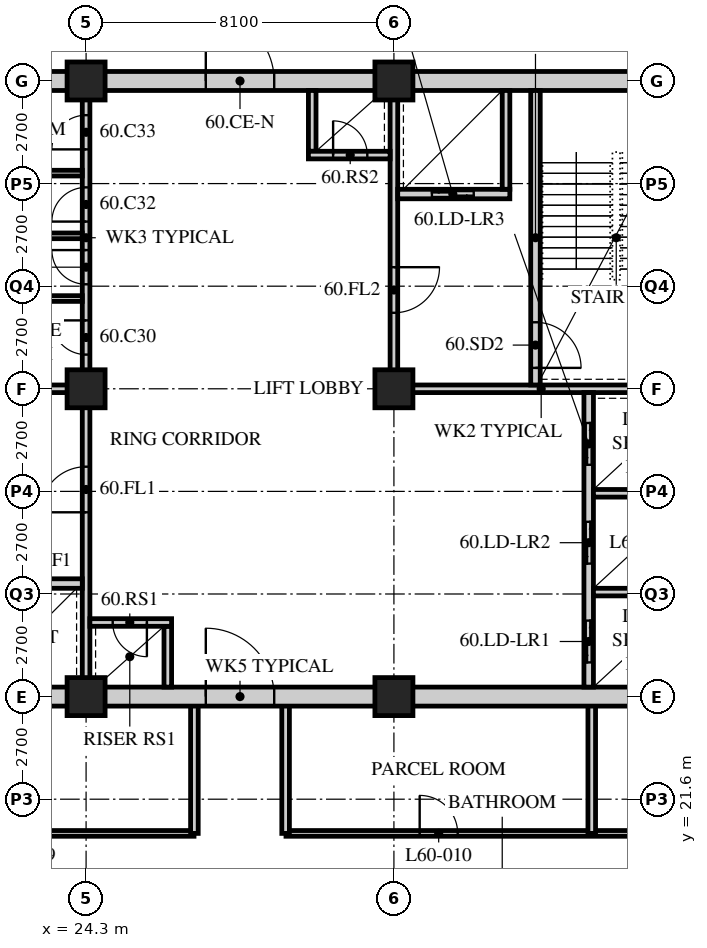
"""IFC4 building model, lengths in metres.
Left out: names, types, materials, properties, quantities, classifications, styles, units other than length and angle.
Written with IfcOpenShell. Run it as: python <this file> out.ifc"""

import sys

from ifc_helpers import new_model, si_unit, direction, frame, frame_2d, origin, origin_2d, place, context, subcontext, project, spatial, rectangle, hollow_rectangle, extrude, element, fill, save


model = new_model("IFC4")
c1 = context("Model", 3, precision=1e-05, world=origin(), true_north=direction((0.0, 1.0)))
c2 = subcontext(c1, "Body", "Model", "MODEL_VIEW")
j1 = project(units=[si_unit("LENGTHUNIT", "METRE"), si_unit("PLANEANGLEUNIT", "RADIAN")], contexts=[c1])
p1 = place(None, origin())
s1 = spatial("IfcSite", under=j1, at=p1, CompositionType="ELEMENT")
p2 = place(p1, origin())
s2 = spatial("IfcBuilding", under=s1, at=p2, CompositionType="ELEMENT")
p3 = place(p2, frame((0.0, 0.0, 231.6)))
s3 = spatial("IfcBuildingStorey", under=s2, at=p3, CompositionType="ELEMENT", Elevation=231.6)
for number, where, z_axis, x_axis in (
    (1, (24.3, 24.3, 0.0), (0.0, 0.0, 1.0), (1.0, 0.0, 0.0)),
    (2, (24.3, 32.4, 0.0), (0.0, 0.0, 1.0), (1.0, 0.0, 0.0)),
    (3, (24.3, 40.5, 0.0), (0.0, 0.0, 1.0), (1.0, 0.0, 0.0)),
    (4, (32.4, 24.3, 0.0), (0.0, 0.0, 1.0), (1.0, 0.0, 0.0)),
    (5, (32.4, 32.4, 0.0), (0.0, 0.0, 1.0), (1.0, 0.0, 0.0)),
    (6, (32.4, 40.5, 0.0), (0.0, 0.0, 1.0), (1.0, 0.0, 0.0)),
):
    element("IfcColumn", number, at=place(p3, frame(where, z_axis=z_axis, x_axis=x_axis)), inside=s3, PredefinedType="COLUMN", context=c2, shape_type="SweptSolid", body=[
        extrude(hollow_rectangle(XDim=1.0, YDim=1.0, WallThickness=0.1, at=origin_2d()), origin(), (0.0, 0.0, 1.0), 3.6),
    ])
p4 = place(p3, frame((9.9, 20.7, 0.0), z_axis=(0.0, 0.0, 1.0), x_axis=(1.0, 0.0, 0.0)))
e7 = element("IfcWall", 7, at=p4, inside=s3, PredefinedType="PARTITIONING", context=c2, shape_type="SweptSolid", body=[
    extrude(rectangle(XDim=17.24, YDim=0.15, at=frame_2d((8.62, 0.0))), origin(), (0.0, 0.0, 1.0), 3.35),
])
p5 = place(p4, frame((2.65, 0.0, 0.0)))
e8 = element("IfcOpeningElement", 8, at=p5, cuts=e7, PredefinedType="OPENING", context=c2, shape_type="SweptSolid", body=[
    extrude(rectangle(XDim=1.0, YDim=2.1, at=frame_2d((0.5, 1.05))), frame((0.0, 0.085, 0.0), z_axis=(0.0, -1.0, 0.0), x_axis=(1.0, 0.0, 0.0)), (0.0, 0.0, 1.0), 0.17),
])
p6 = place(p4, frame((6.772, 0.0, 0.0)))
e9 = element("IfcOpeningElement", 9, at=p6, cuts=e7, PredefinedType="OPENING", context=c2, shape_type="SweptSolid", body=[
    extrude(rectangle(XDim=1.0, YDim=2.1, at=frame_2d((0.5, 1.05))), frame((0.0, 0.085, 0.0), z_axis=(0.0, -1.0, 0.0), x_axis=(1.0, 0.0, 0.0)), (0.0, 0.0, 1.0), 0.17),
])
p7 = place(p4, frame((12.247, 0.0, 0.0)))
e10 = element("IfcOpeningElement", 10, at=p7, cuts=e7, PredefinedType="OPENING", context=c2, shape_type="SweptSolid", body=[
    extrude(rectangle(XDim=1.0, YDim=2.1, at=frame_2d((0.5, 1.05))), frame((0.0, 0.085, 0.0), z_axis=(0.0, -1.0, 0.0), x_axis=(1.0, 0.0, 0.0)), (0.0, 0.0, 1.0), 0.17),
])
p8 = place(p3, frame((29.56, 20.7, 0.0), z_axis=(0.0, 0.0, 1.0), x_axis=(1.0, 0.0, 0.0)))
e11 = element("IfcWall", 11, at=p8, inside=s3, PredefinedType="PARTITIONING", context=c2, shape_type="SweptSolid", body=[
    extrude(rectangle(XDim=13.19, YDim=0.15, at=frame_2d((6.595, 0.0))), origin(), (0.0, 0.0, 1.0), 3.35),
])
p9 = place(p8, frame((3.518, 0.0, 0.0)))
e12 = element("IfcOpeningElement", 12, at=p9, cuts=e11, PredefinedType="OPENING", context=c2, shape_type="SweptSolid", body=[
    extrude(rectangle(XDim=1.0, YDim=2.1, at=frame_2d((0.5, 1.05))), frame((0.0, 0.085, 0.0), z_axis=(0.0, -1.0, 0.0), x_axis=(1.0, 0.0, 0.0)), (0.0, 0.0, 1.0), 0.17),
])
p10 = place(p8, frame((10.118, 0.0, 0.0)))
e13 = element("IfcOpeningElement", 13, at=p10, cuts=e11, PredefinedType="OPENING", context=c2, shape_type="SweptSolid", body=[
    extrude(rectangle(XDim=1.0, YDim=2.1, at=frame_2d((0.5, 1.05))), frame((0.0, 0.085, 0.0), z_axis=(0.0, -1.0, 0.0), x_axis=(1.0, 0.0, 0.0)), (0.0, 0.0, 1.0), 0.17),
])
for number, where, z_axis, x_axis in (
    (14, (37.606, 20.7, 0.0), (0.0, 0.0, 1.0), (0.0, 1.0, 0.0)),
    (15, (27.15, 20.7, 0.0), (0.0, 0.0, 1.0), (0.0, 1.0, 0.0)),
    (16, (29.55, 20.7, 0.0), (0.0, 0.0, 1.0), (0.0, 1.0, 0.0)),
):
    element("IfcWall", number, at=place(p3, frame(where, z_axis=z_axis, x_axis=x_axis)), inside=s3, PredefinedType="SOLIDWALL", context=c2, shape_type="SweptSolid", body=[
        extrude(rectangle(XDim=3.6, YDim=0.2, at=frame_2d((1.8, 0.0))), origin(), (0.0, 0.0, 1.0), 3.35),
    ])
p11 = place(p3, frame((15.95, 24.3, 0.0), z_axis=(0.0, 0.0, 1.0), x_axis=(1.0, 0.0, 0.0)))
e17 = element("IfcWall", 17, at=p11, inside=s3, PredefinedType="SOLIDWALL", context=c2, shape_type="SweptSolid", body=[
    extrude(rectangle(XDim=24.8, YDim=0.5, at=frame_2d((12.4, 0.0))), origin(), (0.0, 0.0, 1.0), 2.588),
])
p12 = place(p11, frame((11.5, 0.0, 0.0)))
e18 = element("IfcOpeningElement", 18, at=p12, cuts=e17, PredefinedType="OPENING", context=c2, shape_type="SweptSolid", body=[
    extrude(rectangle(XDim=1.8, YDim=2.4, at=frame_2d((0.9, 1.2))), frame((0.0, 0.26, 0.0), z_axis=(0.0, -1.0, 0.0), x_axis=(1.0, 0.0, 0.0)), (0.0, 0.0, 1.0), 0.52),
])
p13 = place(p3, frame((15.95, 40.5, 0.0), z_axis=(0.0, 0.0, 1.0), x_axis=(1.0, 0.0, 0.0)))
e19 = element("IfcWall", 19, at=p13, inside=s3, PredefinedType="SOLIDWALL", context=c2, shape_type="SweptSolid", body=[
    extrude(rectangle(XDim=24.8, YDim=0.5, at=frame_2d((12.4, 0.0))), origin(), (0.0, 0.0, 1.0), 2.588),
])
p14 = place(p13, frame((11.5, 0.0, 0.0)))
e20 = element("IfcOpeningElement", 20, at=p14, cuts=e19, PredefinedType="OPENING", context=c2, shape_type="SweptSolid", body=[
    extrude(rectangle(XDim=1.8, YDim=2.4, at=frame_2d((0.9, 1.2))), frame((0.0, 0.26, 0.0), z_axis=(0.0, -1.0, 0.0), x_axis=(1.0, 0.0, 0.0)), (0.0, 0.0, 1.0), 0.52),
])
p15 = place(p3, frame((16.45, 32.4, 0.0), z_axis=(0.0, 0.0, 1.0), x_axis=(1.0, 0.0, 0.0)))
e21 = element("IfcWall", 21, at=p15, inside=s3, PredefinedType="SOLIDWALL", context=c2, shape_type="SweptSolid", body=[
    extrude(rectangle(XDim=7.95, YDim=0.2, at=frame_2d((3.975, 0.0))), origin(), (0.0, 0.0, 1.0), 2.588),
])
p16 = place(p3, frame((24.3, 24.55, 0.0), z_axis=(0.0, 0.0, 1.0), x_axis=(0.0, 1.0, 0.0)))
e22 = element("IfcWall", 22, at=p16, inside=s3, PredefinedType="SOLIDWALL", context=c2, shape_type="SweptSolid", body=[
    extrude(rectangle(XDim=7.75, YDim=0.2, at=frame_2d((3.875, 0.0))), origin(), (0.0, 0.0, 1.0), 2.588),
])
p17 = place(p16, frame((4.6, 0.0, 0.0)))
e23 = element("IfcOpeningElement", 23, at=p17, cuts=e22, PredefinedType="OPENING", context=c2, shape_type="SweptSolid", body=[
    extrude(rectangle(XDim=1.2, YDim=2.1, at=frame_2d((0.6, 1.05))), frame((0.0, 0.11, 0.0), z_axis=(0.0, -1.0, 0.0), x_axis=(1.0, 0.0, 0.0)), (0.0, 0.0, 1.0), 0.22),
])
p18 = place(p3, frame((21.25, 27.275, 0.0), z_axis=(0.0, 0.0, 1.0), x_axis=(1.0, 0.0, 0.0)))
e24 = element("IfcWall", 24, at=p18, inside=s3, PredefinedType="SOLIDWALL", context=c2, shape_type="SweptSolid", body=[
    extrude(rectangle(XDim=2.95, YDim=0.25, at=frame_2d((1.475, 0.0))), origin(), (0.0, 0.0, 1.0), 3.35),
])
p19 = place(p18, frame((0.95, 0.0, 0.0)))
e25 = element("IfcOpeningElement", 25, at=p19, cuts=e24, PredefinedType="OPENING", context=c2, shape_type="SweptSolid", body=[
    extrude(rectangle(XDim=1.1, YDim=2.4, at=frame_2d((0.55, 1.2))), frame((0.0, 0.135, 0.0), z_axis=(0.0, -1.0, 0.0), x_axis=(1.0, 0.0, 0.0)), (0.0, 0.0, 1.0), 0.27),
])
p20 = place(p3, frame((26.45, 24.55, 0.0), z_axis=(0.0, 0.0, 1.0), x_axis=(0.0, 1.0, 0.0)))
e26 = element("IfcWall", 26, at=p20, inside=s3, PredefinedType="SOLIDWALL", context=c2, shape_type="SweptSolid", body=[
    extrude(rectangle(XDim=1.6, YDim=0.2, at=frame_2d((0.8, 0.0))), origin(), (0.0, 0.0, 1.0), 3.35),
])
p21 = place(p3, frame((24.4, 26.25, 0.0), z_axis=(0.0, 0.0, 1.0), x_axis=(1.0, 0.0, 0.0)))
e27 = element("IfcWall", 27, at=p21, inside=s3, PredefinedType="SOLIDWALL", context=c2, shape_type="SweptSolid", body=[
    extrude(rectangle(XDim=2.15, YDim=0.2, at=frame_2d((1.075, 0.0))), origin(), (0.0, 0.0, 1.0), 3.35),
])
p22 = place(p21, frame((0.6, 0.0, 0.0)))
e28 = element("IfcOpeningElement", 28, at=p22, cuts=e27, PredefinedType="OPENING", context=c2, shape_type="SweptSolid", body=[
    extrude(rectangle(XDim=0.9, YDim=2.1, at=frame_2d((0.45, 1.05))), frame((0.0, 0.11, 0.0), z_axis=(0.0, -1.0, 0.0), x_axis=(1.0, 0.0, 0.0)), (0.0, 0.0, 1.0), 0.22),
])
p23 = place(p3, frame((32.3, 32.4, 0.0), z_axis=(0.0, 0.0, 1.0), x_axis=(1.0, 0.0, 0.0)))
e29 = element("IfcWall", 29, at=p23, inside=s3, PredefinedType="SOLIDWALL", context=c2, shape_type="SweptSolid", body=[
    extrude(rectangle(XDim=7.95, YDim=0.2, at=frame_2d((3.975, 0.0))), origin(), (0.0, 0.0, 1.0), 2.588),
])
p24 = place(p3, frame((32.4, 32.5, 0.0), z_axis=(0.0, 0.0, 1.0), x_axis=(0.0, 1.0, 0.0)))
e30 = element("IfcWall", 30, at=p24, inside=s3, PredefinedType="SOLIDWALL", context=c2, shape_type="SweptSolid", body=[
    extrude(rectangle(XDim=7.75, YDim=0.2, at=frame_2d((3.875, 0.0))), origin(), (0.0, 0.0, 1.0), 2.588),
])
p25 = place(p24, frame((1.9, 0.0, 0.0)))
e31 = element("IfcOpeningElement", 31, at=p25, cuts=e30, PredefinedType="OPENING", context=c2, shape_type="SweptSolid", body=[
    extrude(rectangle(XDim=1.2, YDim=2.1, at=frame_2d((0.6, 1.05))), frame((0.0, 0.11, 0.0), z_axis=(0.0, -1.0, 0.0), x_axis=(1.0, 0.0, 0.0)), (0.0, 0.0, 1.0), 0.22),
])
p26 = place(p3, frame((37.525, 24.55, 0.0), z_axis=(0.0, 0.0, 1.0), x_axis=(0.0, 1.0, 0.0)))
e32 = element("IfcWall", 32, at=p26, inside=s3, PredefinedType="SOLIDWALL", context=c2, shape_type="SweptSolid", body=[
    extrude(rectangle(XDim=7.75, YDim=0.25, at=frame_2d((3.875, 0.0))), origin(), (0.0, 0.0, 1.0), 3.35),
])
p27 = place(p26, frame((0.65, 0.0, 0.0)))
e33 = element("IfcOpeningElement", 33, at=p27, cuts=e32, PredefinedType="OPENING", context=c2, shape_type="SweptSolid", body=[
    extrude(rectangle(XDim=1.1, YDim=2.4, at=frame_2d((0.55, 1.2))), frame((0.0, 0.135, 0.0), z_axis=(0.0, -1.0, 0.0), x_axis=(1.0, 0.0, 0.0)), (0.0, 0.0, 1.0), 0.27),
])
p28 = place(p26, frame((3.25, 0.0, 0.0)))
e34 = element("IfcOpeningElement", 34, at=p28, cuts=e32, PredefinedType="OPENING", context=c2, shape_type="SweptSolid", body=[
    extrude(rectangle(XDim=1.1, YDim=2.4, at=frame_2d((0.55, 1.2))), frame((0.0, 0.135, 0.0), z_axis=(0.0, -1.0, 0.0), x_axis=(1.0, 0.0, 0.0)), (0.0, 0.0, 1.0), 0.27),
])
p29 = place(p26, frame((5.85, 0.0, 0.0)))
e35 = element("IfcOpeningElement", 35, at=p29, cuts=e32, PredefinedType="OPENING", context=c2, shape_type="SweptSolid", body=[
    extrude(rectangle(XDim=1.1, YDim=2.4, at=frame_2d((0.55, 1.2))), frame((0.0, 0.135, 0.0), z_axis=(0.0, -1.0, 0.0), x_axis=(1.0, 0.0, 0.0)), (0.0, 0.0, 1.0), 0.27),
])
for number, where, z_axis, x_axis in (
    (36, (37.65, 27.05, 0.0), (0.0, 0.0, 1.0), (1.0, 0.0, 0.0)),
    (37, (37.65, 29.65, 0.0), (0.0, 0.0, 1.0), (1.0, 0.0, 0.0)),
):
    element("IfcWall", number, at=place(p3, frame(where, z_axis=z_axis, x_axis=x_axis)), inside=s3, PredefinedType="SOLIDWALL", context=c2, shape_type="SweptSolid", body=[
        extrude(rectangle(XDim=2.6, YDim=0.2, at=frame_2d((1.3, 0.0))), origin(), (0.0, 0.0, 1.0), 3.35),
    ])
p30 = place(p3, frame((36.125, 32.5, 0.0), z_axis=(0.0, 0.0, 1.0), x_axis=(0.0, 1.0, 0.0)))
e38 = element("IfcWall", 38, at=p30, inside=s3, PredefinedType="SOLIDWALL", context=c2, shape_type="SweptSolid", body=[
    extrude(rectangle(XDim=7.75, YDim=0.25, at=frame_2d((3.875, 0.0))), origin(), (0.0, 0.0, 1.0), 3.35),
])
p31 = place(p30, frame((0.45, 0.0, 0.0)))
e39 = element("IfcOpeningElement", 39, at=p31, cuts=e38, PredefinedType="OPENING", context=c2, shape_type="SweptSolid", body=[
    extrude(rectangle(XDim=1.2, YDim=2.1, at=frame_2d((0.6, 1.05))), frame((0.0, 0.135, 0.0), z_axis=(0.0, -1.0, 0.0), x_axis=(1.0, 0.0, 0.0)), (0.0, 0.0, 1.0), 0.27),
])
p32 = place(p3, frame((32.5, 37.525, 0.0), z_axis=(0.0, 0.0, 1.0), x_axis=(1.0, 0.0, 0.0)))
e40 = element("IfcWall", 40, at=p32, inside=s3, PredefinedType="SOLIDWALL", context=c2, shape_type="SweptSolid", body=[
    extrude(rectangle(XDim=2.95, YDim=0.25, at=frame_2d((1.475, 0.0))), origin(), (0.0, 0.0, 1.0), 3.35),
])
p33 = place(p32, frame((0.9, 0.0, 0.0)))
e41 = element("IfcOpeningElement", 41, at=p33, cuts=e40, PredefinedType="OPENING", context=c2, shape_type="SweptSolid", body=[
    extrude(rectangle(XDim=1.1, YDim=2.4, at=frame_2d((0.55, 1.2))), frame((0.0, 0.135, 0.0), z_axis=(0.0, -1.0, 0.0), x_axis=(1.0, 0.0, 0.0)), (0.0, 0.0, 1.0), 0.27),
])
p34 = place(p3, frame((35.35, 37.65, 0.0), z_axis=(0.0, 0.0, 1.0), x_axis=(0.0, 1.0, 0.0)))
e42 = element("IfcWall", 42, at=p34, inside=s3, PredefinedType="SOLIDWALL", context=c2, shape_type="SweptSolid", body=[
    extrude(rectangle(XDim=2.6, YDim=0.2, at=frame_2d((1.3, 0.0))), origin(), (0.0, 0.0, 1.0), 3.35),
])
p35 = place(p3, frame((30.25, 38.65, 0.0), z_axis=(0.0, 0.0, 1.0), x_axis=(0.0, 1.0, 0.0)))
e43 = element("IfcWall", 43, at=p35, inside=s3, PredefinedType="SOLIDWALL", context=c2, shape_type="SweptSolid", body=[
    extrude(rectangle(XDim=1.6, YDim=0.2, at=frame_2d((0.8, 0.0))), origin(), (0.0, 0.0, 1.0), 3.35),
])
p36 = place(p3, frame((30.15, 38.55, 0.0), z_axis=(0.0, 0.0, 1.0), x_axis=(1.0, 0.0, 0.0)))
e44 = element("IfcWall", 44, at=p36, inside=s3, PredefinedType="SOLIDWALL", context=c2, shape_type="SweptSolid", body=[
    extrude(rectangle(XDim=2.15, YDim=0.2, at=frame_2d((1.075, 0.0))), origin(), (0.0, 0.0, 1.0), 3.35),
])
p37 = place(p36, frame((0.65, 0.0, 0.0)))
e45 = element("IfcOpeningElement", 45, at=p37, cuts=e44, PredefinedType="OPENING", context=c2, shape_type="SweptSolid", body=[
    extrude(rectangle(XDim=0.9, YDim=2.1, at=frame_2d((0.45, 1.05))), frame((0.0, 0.11, 0.0), z_axis=(0.0, -1.0, 0.0), x_axis=(1.0, 0.0, 0.0)), (0.0, 0.0, 1.0), 0.22),
])
p38 = place(p3, frame((24.3, 32.5, 0.0), z_axis=(0.0, 0.0, 1.0), x_axis=(0.0, 1.0, 0.0)))
e46 = element("IfcWall", 46, at=p38, inside=s3, PredefinedType="PARTITIONING", context=c2, shape_type="SweptSolid", body=[
    extrude(rectangle(XDim=7.75, YDim=0.2, at=frame_2d((3.875, 0.0))), origin(), (0.0, 0.0, 1.0), 2.588),
])
p39 = place(p38, frame((0.8, 0.0, 0.0)))
e47 = element("IfcOpeningElement", 47, at=p39, cuts=e46, PredefinedType="OPENING", context=c2, shape_type="SweptSolid", body=[
    extrude(rectangle(XDim=0.9, YDim=2.1, at=frame_2d((0.45, 1.05))), frame((0.0, 0.11, 0.0), z_axis=(0.0, -1.0, 0.0), x_axis=(1.0, 0.0, 0.0)), (0.0, 0.0, 1.0), 0.22),
])
p40 = place(p38, frame((2.65, 0.0, 0.0)))
e48 = element("IfcOpeningElement", 48, at=p40, cuts=e46, PredefinedType="OPENING", context=c2, shape_type="SweptSolid", body=[
    extrude(rectangle(XDim=0.9, YDim=2.1, at=frame_2d((0.45, 1.05))), frame((0.0, 0.11, 0.0), z_axis=(0.0, -1.0, 0.0), x_axis=(1.0, 0.0, 0.0)), (0.0, 0.0, 1.0), 0.22),
])
p41 = place(p38, frame((4.3, 0.0, 0.0)))
e49 = element("IfcOpeningElement", 49, at=p41, cuts=e46, PredefinedType="OPENING", context=c2, shape_type="SweptSolid", body=[
    extrude(rectangle(XDim=0.9, YDim=2.1, at=frame_2d((0.45, 1.05))), frame((0.0, 0.11, 0.0), z_axis=(0.0, -1.0, 0.0), x_axis=(1.0, 0.0, 0.0)), (0.0, 0.0, 1.0), 0.22),
])
p42 = place(p38, frame((6.2, 0.0, 0.0)))
e50 = element("IfcOpeningElement", 50, at=p42, cuts=e46, PredefinedType="OPENING", context=c2, shape_type="SweptSolid", body=[
    extrude(rectangle(XDim=0.9, YDim=2.1, at=frame_2d((0.45, 1.05))), frame((0.0, 0.11, 0.0), z_axis=(0.0, -1.0, 0.0), x_axis=(1.0, 0.0, 0.0)), (0.0, 0.0, 1.0), 0.22),
])
for number, where, z_axis, x_axis in (
    (51, (21.05, 34.775, 0.0), (0.0, 0.0, 1.0), (1.0, 0.0, 0.0)),
    (52, (21.05, 36.425, 0.0), (0.0, 0.0, 1.0), (1.0, 0.0, 0.0)),
):
    element("IfcWall", number, at=place(p3, frame(where, z_axis=z_axis, x_axis=x_axis)), inside=s3, PredefinedType="PARTITIONING", context=c2, shape_type="SweptSolid", body=[
        extrude(rectangle(XDim=3.15, YDim=0.15, at=frame_2d((1.575, 0.0))), origin(), (0.0, 0.0, 1.0), 3.35),
    ])
p43 = place(p3, frame((21.2, 38.075, 0.0), z_axis=(0.0, 0.0, 1.0), x_axis=(1.0, 0.0, 0.0)))
e53 = element("IfcWall", 53, at=p43, inside=s3, PredefinedType="PARTITIONING", context=c2, shape_type="SweptSolid", body=[
    extrude(rectangle(XDim=3.0, YDim=0.15, at=frame_2d((1.5, 0.0))), origin(), (0.0, 0.0, 1.0), 3.35),
])
p44 = place(p9, origin())
e54 = element("IfcDoor", 54, at=p44, inside=s3, OperationType="SINGLE_SWING_LEFT", PredefinedType="DOOR", context=c2, shape_type="SweptSolid", body=[
    extrude(rectangle(XDim=1.0, YDim=2.1, at=frame_2d((0.5, 1.05))), frame((0.0, 0.025, 0.0), z_axis=(0.0, -1.0, 0.0), x_axis=(1.0, 0.0, 0.0)), (0.0, 0.0, 1.0), 0.05),
])
fill(e12, e54)
p45 = place(p39, origin())
e55 = element("IfcDoor", 55, at=p45, inside=s3, OperationType="SINGLE_SWING_RIGHT", PredefinedType="DOOR", context=c2, shape_type="SweptSolid", body=[
    extrude(rectangle(XDim=0.9, YDim=2.1, at=frame_2d((0.45, 1.05))), frame((0.0, 0.025, 0.0), z_axis=(0.0, -1.0, 0.0), x_axis=(1.0, 0.0, 0.0)), (0.0, 0.0, 1.0), 0.05),
])
fill(e47, e55)
p46 = place(p40, origin())
e56 = element("IfcDoor", 56, at=p46, inside=s3, OperationType="SINGLE_SWING_RIGHT", PredefinedType="DOOR", context=c2, shape_type="SweptSolid", body=[
    extrude(rectangle(XDim=0.9, YDim=2.1, at=frame_2d((0.45, 1.05))), frame((0.0, 0.025, 0.0), z_axis=(0.0, -1.0, 0.0), x_axis=(1.0, 0.0, 0.0)), (0.0, 0.0, 1.0), 0.05),
])
fill(e48, e56)
p47 = place(p41, origin())
e57 = element("IfcDoor", 57, at=p47, inside=s3, OperationType="SINGLE_SWING_LEFT", PredefinedType="DOOR", context=c2, shape_type="SweptSolid", body=[
    extrude(rectangle(XDim=0.9, YDim=2.1, at=frame_2d((0.45, 1.05))), frame((0.0, 0.025, 0.0), z_axis=(0.0, -1.0, 0.0), x_axis=(1.0, 0.0, 0.0)), (0.0, 0.0, 1.0), 0.05),
])
fill(e49, e57)
p48 = place(p42, origin())
e58 = element("IfcDoor", 58, at=p48, inside=s3, OperationType="SINGLE_SWING_LEFT", PredefinedType="DOOR", context=c2, shape_type="SweptSolid", body=[
    extrude(rectangle(XDim=0.9, YDim=2.1, at=frame_2d((0.45, 1.05))), frame((0.0, 0.025, 0.0), z_axis=(0.0, -1.0, 0.0), x_axis=(1.0, 0.0, 0.0)), (0.0, 0.0, 1.0), 0.05),
])
fill(e50, e58)
p49 = place(p17, origin())
e59 = element("IfcDoor", 59, at=p49, inside=s3, OperationType="SINGLE_SWING_LEFT", PredefinedType="DOOR", context=c2, shape_type="SweptSolid", body=[
    extrude(rectangle(XDim=1.2, YDim=2.1, at=frame_2d((0.6, 1.05))), frame((0.0, 0.025, 0.0), z_axis=(0.0, -1.0, 0.0), x_axis=(1.0, 0.0, 0.0)), (0.0, 0.0, 1.0), 0.05),
])
fill(e23, e59)
p50 = place(p22, origin())
e60 = element("IfcDoor", 60, at=p50, inside=s3, OperationType="SINGLE_SWING_LEFT", PredefinedType="DOOR", context=c2, shape_type="SweptSolid", body=[
    extrude(rectangle(XDim=0.9, YDim=2.1, at=frame_2d((0.45, 1.05))), frame((0.0, 0.025, 0.0), z_axis=(0.0, -1.0, 0.0), x_axis=(1.0, 0.0, 0.0)), (0.0, 0.0, 1.0), 0.05),
])
fill(e28, e60)
p51 = place(p31, origin())
e61 = element("IfcDoor", 61, at=p51, inside=s3, OperationType="SINGLE_SWING_RIGHT", PredefinedType="DOOR", context=c2, shape_type="SweptSolid", body=[
    extrude(rectangle(XDim=1.2, YDim=2.1, at=frame_2d((0.6, 1.05))), frame((0.0, 0.025, 0.0), z_axis=(0.0, -1.0, 0.0), x_axis=(1.0, 0.0, 0.0)), (0.0, 0.0, 1.0), 0.05),
])
fill(e39, e61)
p52 = place(p25, origin())
e62 = element("IfcDoor", 62, at=p52, inside=s3, OperationType="SINGLE_SWING_LEFT", PredefinedType="DOOR", context=c2, shape_type="SweptSolid", body=[
    extrude(rectangle(XDim=1.2, YDim=2.1, at=frame_2d((0.6, 1.05))), frame((0.0, 0.025, 0.0), z_axis=(0.0, -1.0, 0.0), x_axis=(1.0, 0.0, 0.0)), (0.0, 0.0, 1.0), 0.05),
])
fill(e31, e62)
p53 = place(p37, origin())
e63 = element("IfcDoor", 63, at=p53, inside=s3, OperationType="SINGLE_SWING_LEFT", PredefinedType="DOOR", context=c2, shape_type="SweptSolid", body=[
    extrude(rectangle(XDim=0.9, YDim=2.1, at=frame_2d((0.45, 1.05))), frame((0.0, 0.025, 0.0), z_axis=(0.0, -1.0, 0.0), x_axis=(1.0, 0.0, 0.0)), (0.0, 0.0, 1.0), 0.05),
])
fill(e45, e63)
p54 = place(p27, origin())
e64 = element("IfcDoor", 64, at=p54, inside=s3, OperationType="DOUBLE_DOOR_SLIDING", PredefinedType="DOOR", context=c2, shape_type="SweptSolid", body=[
    extrude(rectangle(XDim=1.1, YDim=2.4, at=frame_2d((0.55, 1.2))), frame((0.0, 0.025, 0.0), z_axis=(0.0, -1.0, 0.0), x_axis=(1.0, 0.0, 0.0)), (0.0, 0.0, 1.0), 0.05),
])
fill(e33, e64)
p55 = place(p28, origin())
e65 = element("IfcDoor", 65, at=p55, inside=s3, OperationType="DOUBLE_DOOR_SLIDING", PredefinedType="DOOR", context=c2, shape_type="SweptSolid", body=[
    extrude(rectangle(XDim=1.1, YDim=2.4, at=frame_2d((0.55, 1.2))), frame((0.0, 0.025, 0.0), z_axis=(0.0, -1.0, 0.0), x_axis=(1.0, 0.0, 0.0)), (0.0, 0.0, 1.0), 0.05),
])
fill(e34, e65)
p56 = place(p29, origin())
e66 = element("IfcDoor", 66, at=p56, inside=s3, OperationType="DOUBLE_DOOR_SLIDING", PredefinedType="DOOR", context=c2, shape_type="SweptSolid", body=[
    extrude(rectangle(XDim=1.1, YDim=2.4, at=frame_2d((0.55, 1.2))), frame((0.0, 0.025, 0.0), z_axis=(0.0, -1.0, 0.0), x_axis=(1.0, 0.0, 0.0)), (0.0, 0.0, 1.0), 0.05),
])
fill(e35, e66)
p57 = place(p33, origin())
e67 = element("IfcDoor", 67, at=p57, inside=s3, OperationType="DOUBLE_DOOR_SLIDING", PredefinedType="DOOR", context=c2, shape_type="SweptSolid", body=[
    extrude(rectangle(XDim=1.1, YDim=2.4, at=frame_2d((0.55, 1.2))), frame((0.0, 0.025, 0.0), z_axis=(0.0, -1.0, 0.0), x_axis=(1.0, 0.0, 0.0)), (0.0, 0.0, 1.0), 0.05),
])
fill(e41, e67)
p58 = place(p12, origin())
e68 = element("IfcDoor", 68, at=p58, inside=s3, OperationType="DOUBLE_DOOR_SINGLE_SWING", PredefinedType="DOOR", context=c2, shape_type="SweptSolid", body=[
    extrude(rectangle(XDim=1.8, YDim=2.4, at=frame_2d((0.9, 1.2))), frame((0.0, 0.025, 0.0), z_axis=(0.0, -1.0, 0.0), x_axis=(1.0, 0.0, 0.0)), (0.0, 0.0, 1.0), 0.05),
])
fill(e18, e68)
p59 = place(p14, origin())
e69 = element("IfcDoor", 69, at=p59, inside=s3, OperationType="DOUBLE_DOOR_SINGLE_SWING", PredefinedType="DOOR", context=c2, shape_type="SweptSolid", body=[
    extrude(rectangle(XDim=1.8, YDim=2.4, at=frame_2d((0.9, 1.2))), frame((0.0, 0.025, 0.0), z_axis=(0.0, -1.0, 0.0), x_axis=(1.0, 0.0, 0.0)), (0.0, 0.0, 1.0), 0.05),
])
fill(e20, e69)
save(model, sys.argv[1])
